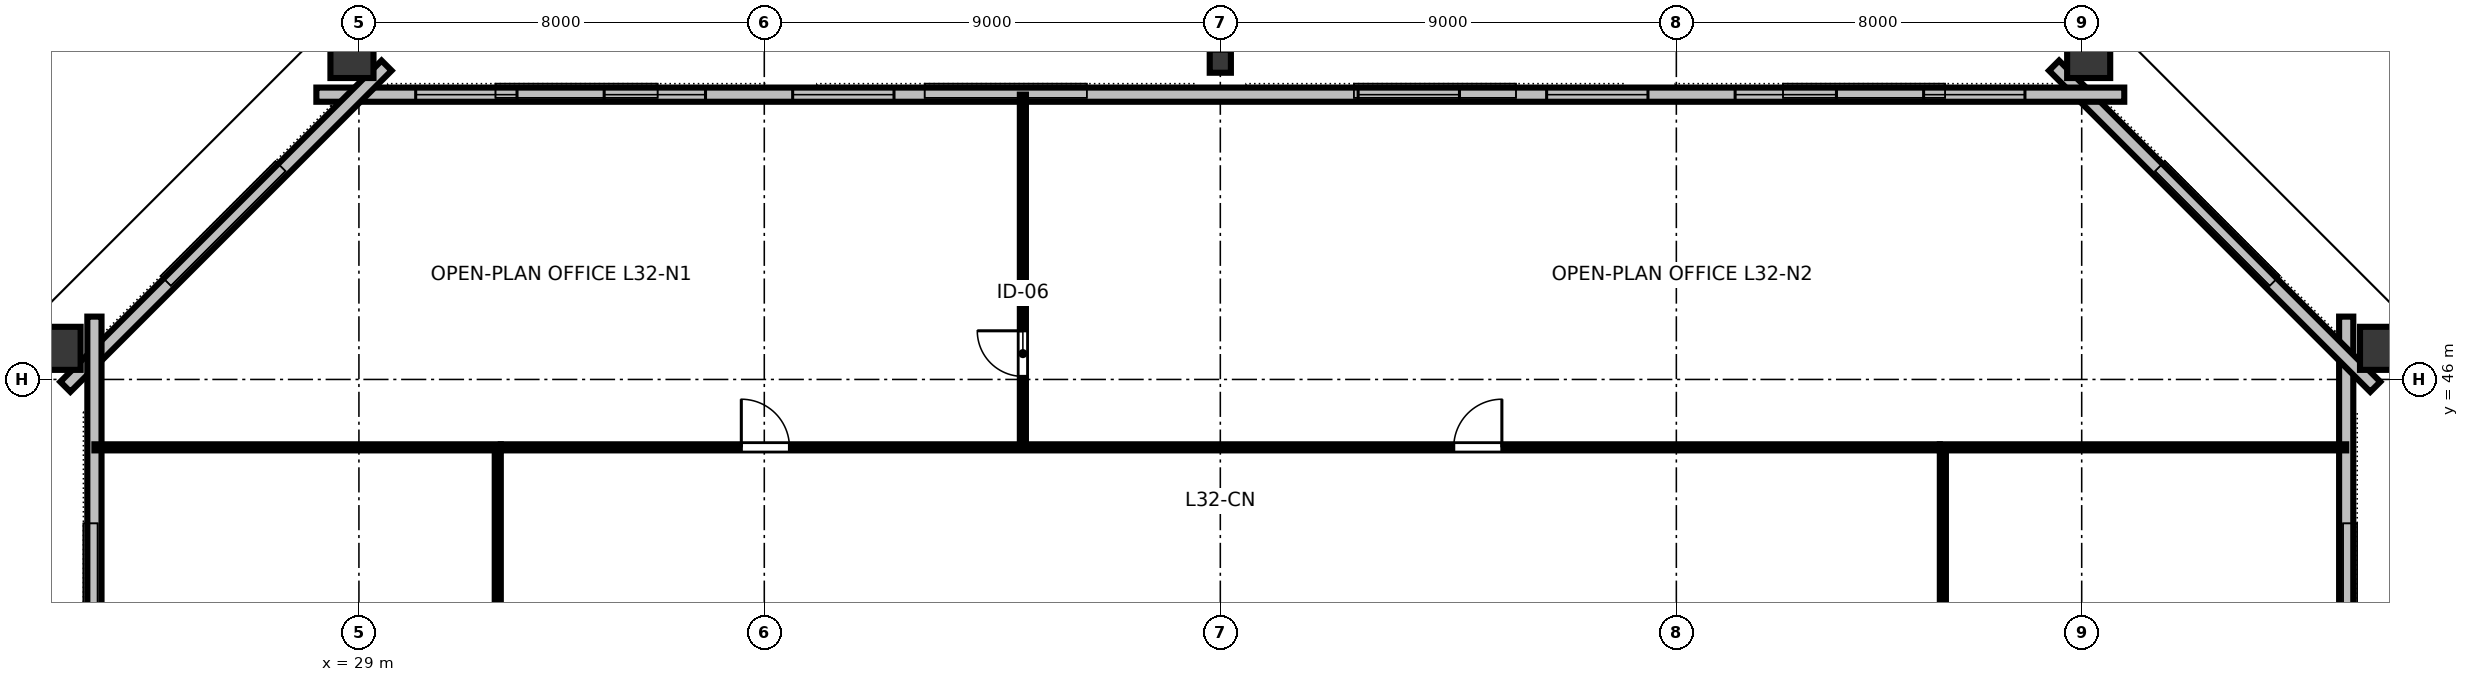
"""IFC4 building model, lengths in metres.
Left out: names, types, materials, properties, quantities, classifications, styles, units other than length and angle.
Written with IfcOpenShell. Run it as: python <this file> out.ifc"""

import sys

from ifc_helpers import new_model, si_unit, direction, frame, frame_2d, origin, origin_2d, place, context, subcontext, project, spatial, rectangle, hollow_rectangle, i_section, extrude, element, fill, save


model = new_model("IFC4")
c1 = context("Model", 3, precision=1e-05, world=origin(), true_north=direction((0.0, 1.0)))
c2 = subcontext(c1, "Body", "Model", "MODEL_VIEW")
j1 = project(units=[si_unit("LENGTHUNIT", "METRE"), si_unit("PLANEANGLEUNIT", "RADIAN")], contexts=[c1])
p1 = place(None, origin())
s1 = spatial("IfcSite", under=j1, at=p1, CompositionType="ELEMENT")
p2 = place(p1, origin())
s2 = spatial("IfcBuilding", under=s1, at=p2, CompositionType="ELEMENT")
p3 = place(p2, frame((0.0, 0.0, 124.0)))
s3 = spatial("IfcBuildingStorey", under=s2, at=p3, CompositionType="ELEMENT", Elevation=124.0)
p4 = place(p3, frame((68.992, 46.614, 0.0), z_axis=(0.088768956543, 0.044637690454, 0.995051530799), x_axis=(-0.888984507302, -0.447028069279, 0.099360208609)))
e1 = element("IfcColumn", 1, at=p4, inside=s3, PredefinedType="COLUMN", context=c2, shape_type="SweptSolid", body=[
    extrude(hollow_rectangle(XDim=0.85, YDim=1.0, WallThickness=0.05, at=origin_2d()), origin(), (0.0, 0.0, 1.0), 3.375),
])
p5 = place(p3, frame((63.137, 52.448, 0.0), z_axis=(0.059349985837, 0.074042726233, 0.995487445362), x_axis=(-0.780273153145, 0.625438891084, 0.0)))
e2 = element("IfcColumn", 2, at=p5, inside=s3, PredefinedType="COLUMN", context=c2, shape_type="SweptSolid", body=[
    extrude(hollow_rectangle(XDim=0.85, YDim=1.0, WallThickness=0.05, at=origin_2d()), origin(), (0.0, 0.0, 1.0), 3.373),
])
p6 = place(p3, frame((46.0, 52.28, 0.0), z_axis=(0.0, 0.074245582927, 0.997239987874), x_axis=(-1.0, 0.0, 0.0)))
e3 = element("IfcColumn", 3, at=p6, inside=s3, PredefinedType="COLUMN", context=c2, shape_type="SweptSolid", body=[
    extrude(i_section(OverallWidth=0.418, OverallDepth=0.455, WebThickness=0.042, FlangeThickness=0.068, FilletRadius=0.025, at=origin_2d()), origin(), (0.0, 0.0, 1.0), 3.367),
])
p7 = place(p3, frame((28.863, 52.448, 0.0), z_axis=(-0.059349985837, 0.074042726233, 0.995487445362), x_axis=(-0.780273153145, -0.625438891084, 0.0)))
e4 = element("IfcColumn", 4, at=p7, inside=s3, PredefinedType="COLUMN", context=c2, shape_type="SweptSolid", body=[
    extrude(hollow_rectangle(XDim=0.85, YDim=1.0, WallThickness=0.05, at=origin_2d()), origin(), (0.0, 0.0, 1.0), 3.373),
])
p8 = place(p3, frame((23.008, 46.614, 0.0), z_axis=(-0.088768956543, 0.044637690454, 0.995051530799), x_axis=(0.888984507302, -0.447028069279, 0.099360208609)))
e5 = element("IfcColumn", 5, at=p8, inside=s3, PredefinedType="COLUMN", context=c2, shape_type="SweptSolid", body=[
    extrude(hollow_rectangle(XDim=0.85, YDim=1.0, WallThickness=0.05, at=origin_2d()), origin(), (0.0, 0.0, 1.0), 3.375),
])
p9 = place(p3, frame((68.22, 16.76, 0.0), z_axis=(0.0, 0.0, 1.0), x_axis=(0.0, 1.0, 0.0)))
e6 = element("IfcWall", 6, at=p9, inside=s3, PredefinedType="STANDARD", context=c2, shape_type="SweptSolid", body=[
    extrude(rectangle(XDim=30.48, YDim=0.28, at=frame_2d((15.24, 0.0))), origin(), (0.0, 0.0, 1.0), 3.36),
])
p10 = place(p9, frame((6.16, 0.0, 0.8)))
e7 = element("IfcOpeningElement", 7, at=p10, cuts=e6, PredefinedType="OPENING", context=c2, shape_type="SweptSolid", body=[
    extrude(rectangle(XDim=2.0, YDim=1.95, at=frame_2d((1.0, 0.975))), frame((0.0, 0.15, 0.0), z_axis=(0.0, -1.0, 0.0), x_axis=(1.0, 0.0, 0.0)), (0.0, 0.0, 1.0), 0.3),
])
p11 = place(p9, frame((22.32, 0.0, 0.8)))
e8 = element("IfcOpeningElement", 8, at=p11, cuts=e6, PredefinedType="OPENING", context=c2, shape_type="SweptSolid", body=[
    extrude(rectangle(XDim=2.0, YDim=1.95, at=frame_2d((1.0, 0.975))), frame((0.0, 0.15, 0.0), z_axis=(0.0, -1.0, 0.0), x_axis=(1.0, 0.0, 0.0)), (0.0, 0.0, 1.0), 0.3),
])
p12 = place(p3, frame((68.794, 45.854, 0.0), z_axis=(0.0, 0.0, 1.0), x_axis=(-0.707106781187, 0.707106781187, 0.0)))
e9 = element("IfcWall", 9, at=p12, inside=s3, PredefinedType="STANDARD", context=c2, shape_type="SweptSolid", body=[
    extrude(rectangle(XDim=8.965, YDim=0.28, at=frame_2d((4.482, 0.0))), origin(), (0.0, 0.0, 1.0), 3.36),
])
p13 = place(p3, frame((63.84, 51.62, 0.0), z_axis=(0.0, 0.0, 1.0), x_axis=(-1.0, 0.0, 0.0)))
e10 = element("IfcWall", 10, at=p13, inside=s3, PredefinedType="STANDARD", context=c2, shape_type="SweptSolid", body=[
    extrude(rectangle(XDim=35.68, YDim=0.28, at=frame_2d((17.84, 0.0))), origin(), (0.0, 0.0, 1.0), 3.36),
])
p14 = place(p13, frame((1.96, 0.0, 0.8)))
e11 = element("IfcOpeningElement", 11, at=p14, cuts=e10, PredefinedType="OPENING", context=c2, shape_type="SweptSolid", body=[
    extrude(rectangle(XDim=2.0, YDim=1.95, at=frame_2d((1.0, 0.975))), frame((0.0, 0.15, 0.0), z_axis=(0.0, -1.0, 0.0), x_axis=(1.0, 0.0, 0.0)), (0.0, 0.0, 1.0), 0.3),
])
p15 = place(p13, frame((5.68, 0.0, 0.8)))
e12 = element("IfcOpeningElement", 12, at=p15, cuts=e10, PredefinedType="OPENING", context=c2, shape_type="SweptSolid", body=[
    extrude(rectangle(XDim=2.0, YDim=1.95, at=frame_2d((1.0, 0.975))), frame((0.0, 0.15, 0.0), z_axis=(0.0, -1.0, 0.0), x_axis=(1.0, 0.0, 0.0)), (0.0, 0.0, 1.0), 0.3),
])
p16 = place(p13, frame((9.4, 0.0, 0.8)))
e13 = element("IfcOpeningElement", 13, at=p16, cuts=e10, PredefinedType="OPENING", context=c2, shape_type="SweptSolid", body=[
    extrude(rectangle(XDim=2.0, YDim=1.95, at=frame_2d((1.0, 0.975))), frame((0.0, 0.15, 0.0), z_axis=(0.0, -1.0, 0.0), x_axis=(1.0, 0.0, 0.0)), (0.0, 0.0, 1.0), 0.3),
])
p17 = place(p13, frame((13.12, 0.0, 0.8)))
e14 = element("IfcOpeningElement", 14, at=p17, cuts=e10, PredefinedType="OPENING", context=c2, shape_type="SweptSolid", body=[
    extrude(rectangle(XDim=2.0, YDim=1.95, at=frame_2d((1.0, 0.975))), frame((0.0, 0.15, 0.0), z_axis=(0.0, -1.0, 0.0), x_axis=(1.0, 0.0, 0.0)), (0.0, 0.0, 1.0), 0.3),
])
p18 = place(p13, frame((24.28, 0.0, 0.8)))
e15 = element("IfcOpeningElement", 15, at=p18, cuts=e10, PredefinedType="OPENING", context=c2, shape_type="SweptSolid", body=[
    extrude(rectangle(XDim=2.0, YDim=1.95, at=frame_2d((1.0, 0.975))), frame((0.0, 0.15, 0.0), z_axis=(0.0, -1.0, 0.0), x_axis=(1.0, 0.0, 0.0)), (0.0, 0.0, 1.0), 0.3),
])
p19 = place(p13, frame((28.0, 0.0, 0.8)))
e16 = element("IfcOpeningElement", 16, at=p19, cuts=e10, PredefinedType="OPENING", context=c2, shape_type="SweptSolid", body=[
    extrude(rectangle(XDim=2.0, YDim=1.95, at=frame_2d((1.0, 0.975))), frame((0.0, 0.15, 0.0), z_axis=(0.0, -1.0, 0.0), x_axis=(1.0, 0.0, 0.0)), (0.0, 0.0, 1.0), 0.3),
])
p20 = place(p13, frame((31.72, 0.0, 0.8)))
e17 = element("IfcOpeningElement", 17, at=p20, cuts=e10, PredefinedType="OPENING", context=c2, shape_type="SweptSolid", body=[
    extrude(rectangle(XDim=2.0, YDim=1.95, at=frame_2d((1.0, 0.975))), frame((0.0, 0.15, 0.0), z_axis=(0.0, -1.0, 0.0), x_axis=(1.0, 0.0, 0.0)), (0.0, 0.0, 1.0), 0.3),
])
p21 = place(p3, frame((29.545, 52.194, 0.0), z_axis=(0.0, 0.0, 1.0), x_axis=(-0.707106781187, -0.707106781187, 0.0)))
e18 = element("IfcWall", 18, at=p21, inside=s3, PredefinedType="STANDARD", context=c2, shape_type="SweptSolid", body=[
    extrude(rectangle(XDim=8.965, YDim=0.28, at=frame_2d((4.482, 0.0))), origin(), (0.0, 0.0, 1.0), 3.36),
])
p22 = place(p3, frame((23.78, 47.24, 0.0), z_axis=(0.0, 0.0, 1.0), x_axis=(0.0, -1.0, 0.0)))
e19 = element("IfcWall", 19, at=p22, inside=s3, PredefinedType="STANDARD", context=c2, shape_type="SweptSolid", body=[
    extrude(rectangle(XDim=30.48, YDim=0.28, at=frame_2d((15.24, 0.0))), origin(), (0.0, 0.0, 1.0), 3.36),
])
p23 = place(p22, frame((6.16, 0.0, 0.8)))
e20 = element("IfcOpeningElement", 20, at=p23, cuts=e19, PredefinedType="OPENING", context=c2, shape_type="SweptSolid", body=[
    extrude(rectangle(XDim=2.0, YDim=1.95, at=frame_2d((1.0, 0.975))), frame((0.0, 0.15, 0.0), z_axis=(0.0, -1.0, 0.0), x_axis=(1.0, 0.0, 0.0)), (0.0, 0.0, 1.0), 0.3),
])
p24 = place(p22, frame((18.28, 0.0, 0.8)))
e21 = element("IfcOpeningElement", 21, at=p24, cuts=e19, PredefinedType="OPENING", context=c2, shape_type="SweptSolid", body=[
    extrude(rectangle(XDim=2.0, YDim=1.95, at=frame_2d((1.0, 0.975))), frame((0.0, 0.15, 0.0), z_axis=(0.0, -1.0, 0.0), x_axis=(1.0, 0.0, 0.0)), (0.0, 0.0, 1.0), 0.3),
])
p25 = place(p22, frame((22.32, 0.0, 0.8)))
e22 = element("IfcOpeningElement", 22, at=p25, cuts=e19, PredefinedType="OPENING", context=c2, shape_type="SweptSolid", body=[
    extrude(rectangle(XDim=2.0, YDim=1.95, at=frame_2d((1.0, 0.975))), frame((0.0, 0.15, 0.0), z_axis=(0.0, -1.0, 0.0), x_axis=(1.0, 0.0, 0.0)), (0.0, 0.0, 1.0), 0.3),
])
p26 = place(p3, frame((42.104, 44.66, 0.0), z_axis=(0.0, 0.0, 1.0), x_axis=(0.0, 1.0, 0.0)))
e23 = element("IfcWall", 23, at=p26, inside=s3, PredefinedType="PARTITIONING", context=c2, shape_type="SweptSolid", body=[
    extrude(rectangle(XDim=6.96, YDim=0.12, at=frame_2d((3.48, 0.0))), origin(), (0.0, 0.0, 1.0), 2.64),
])
p27 = place(p26, frame((1.4, 0.0, 0.0)))
e24 = element("IfcOpeningElement", 24, at=p27, cuts=e23, PredefinedType="OPENING", context=c2, shape_type="SweptSolid", body=[
    extrude(rectangle(XDim=0.9, YDim=2.15, at=frame_2d((0.45, 1.075))), frame((0.0, 0.07, 0.0), z_axis=(0.0, -1.0, 0.0), x_axis=(1.0, 0.0, 0.0)), (0.0, 0.0, 1.0), 0.14),
])
p28 = place(p3, frame((31.8, 44.66, 0.0), z_axis=(0.0, 0.0, 1.0), x_axis=(1.0, 0.0, 0.0)))
e25 = element("IfcWall", 25, at=p28, inside=s3, PredefinedType="PARTITIONING", context=c2, shape_type="SweptSolid", body=[
    extrude(rectangle(XDim=28.4, YDim=0.12, at=frame_2d((14.2, 0.0))), origin(), (0.0, 0.0, 1.0), 2.64),
])
p29 = place(p28, frame((4.747, 0.0, 0.0)))
e26 = element("IfcOpeningElement", 26, at=p29, cuts=e25, PredefinedType="OPENING", context=c2, shape_type="SweptSolid", body=[
    extrude(rectangle(XDim=0.95, YDim=2.15, at=frame_2d((0.475, 1.075))), frame((0.0, 0.07, 0.0), z_axis=(0.0, -1.0, 0.0), x_axis=(1.0, 0.0, 0.0)), (0.0, 0.0, 1.0), 0.14),
])
p30 = place(p28, frame((18.807, 0.0, 0.0)))
e27 = element("IfcOpeningElement", 27, at=p30, cuts=e25, PredefinedType="OPENING", context=c2, shape_type="SweptSolid", body=[
    extrude(rectangle(XDim=0.95, YDim=2.15, at=frame_2d((0.475, 1.075))), frame((0.0, 0.07, 0.0), z_axis=(0.0, -1.0, 0.0), x_axis=(1.0, 0.0, 0.0)), (0.0, 0.0, 1.0), 0.14),
])
p31 = place(p3, frame((31.74, 33.02, 0.0), z_axis=(0.0, 0.0, 1.0), x_axis=(0.0, 1.0, 0.0)))
e28 = element("IfcWall", 28, at=p31, inside=s3, PredefinedType="PARTITIONING", context=c2, shape_type="SweptSolid", body=[
    extrude(rectangle(XDim=11.58, YDim=0.12, at=frame_2d((5.79, 0.0))), origin(), (0.0, 0.0, 1.0), 2.64),
])
p32 = place(p31, frame((0.826, 0.0, 0.0)))
e29 = element("IfcOpeningElement", 29, at=p32, cuts=e28, PredefinedType="OPENING", context=c2, shape_type="SweptSolid", body=[
    extrude(rectangle(XDim=0.95, YDim=2.15, at=frame_2d((0.475, 1.075))), frame((0.0, 0.07, 0.0), z_axis=(0.0, -1.0, 0.0), x_axis=(1.0, 0.0, 0.0)), (0.0, 0.0, 1.0), 0.14),
])
p33 = place(p31, frame((6.516, 0.0, 0.0)))
e30 = element("IfcOpeningElement", 30, at=p33, cuts=e28, PredefinedType="OPENING", context=c2, shape_type="SweptSolid", body=[
    extrude(rectangle(XDim=0.95, YDim=2.15, at=frame_2d((0.475, 1.075))), frame((0.0, 0.07, 0.0), z_axis=(0.0, -1.0, 0.0), x_axis=(1.0, 0.0, 0.0)), (0.0, 0.0, 1.0), 0.14),
])
p34 = place(p3, frame((60.26, 33.02, 0.0), z_axis=(0.0, 0.0, 1.0), x_axis=(0.0, 1.0, 0.0)))
e31 = element("IfcWall", 31, at=p34, inside=s3, PredefinedType="PARTITIONING", context=c2, shape_type="SweptSolid", body=[
    extrude(rectangle(XDim=11.58, YDim=0.12, at=frame_2d((5.79, 0.0))), origin(), (0.0, 0.0, 1.0), 2.64),
])
p35 = place(p34, frame((0.62, 0.0, 0.0)))
e32 = element("IfcOpeningElement", 32, at=p35, cuts=e31, PredefinedType="OPENING", context=c2, shape_type="SweptSolid", body=[
    extrude(rectangle(XDim=0.95, YDim=2.15, at=frame_2d((0.475, 1.075))), frame((0.0, 0.07, 0.0), z_axis=(0.0, -1.0, 0.0), x_axis=(1.0, 0.0, 0.0)), (0.0, 0.0, 1.0), 0.14),
])
p36 = place(p34, frame((6.31, 0.0, 0.0)))
e33 = element("IfcOpeningElement", 33, at=p36, cuts=e31, PredefinedType="OPENING", context=c2, shape_type="SweptSolid", body=[
    extrude(rectangle(XDim=0.95, YDim=2.15, at=frame_2d((0.475, 1.075))), frame((0.0, 0.07, 0.0), z_axis=(0.0, -1.0, 0.0), x_axis=(1.0, 0.0, 0.0)), (0.0, 0.0, 1.0), 0.14),
])
for number, where, z_axis, x_axis in (
    (34, (31.8, 44.66, 0.0), (0.0, 0.0, 1.0), (-1.0, 0.0, 0.0)),
    (35, (60.2, 44.66, 0.0), (0.0, 0.0, 1.0), (1.0, 0.0, 0.0)),
):
    element("IfcWall", number, at=place(p3, frame(where, z_axis=z_axis, x_axis=x_axis)), inside=s3, PredefinedType="PARTITIONING", context=c2, shape_type="SweptSolid", body=[
        extrude(rectangle(XDim=8.02, YDim=0.12, at=frame_2d((4.01, 0.0))), origin(), (0.0, 0.0, 1.0), 2.64),
    ])
p37 = place(p14, origin())
e36 = element("IfcWindow", 36, at=p37, inside=s3, PartitioningType="SINGLE_PANEL", PredefinedType="WINDOW", context=c2, shape_type="SweptSolid", body=[
    extrude(rectangle(XDim=2.0, YDim=1.95, at=frame_2d((1.0, 0.975))), frame((0.0, 0.03, 0.0), z_axis=(0.0, -1.0, 0.0), x_axis=(1.0, 0.0, 0.0)), (0.0, 0.0, 1.0), 0.06),
])
fill(e11, e36)
p38 = place(p15, origin())
e37 = element("IfcWindow", 37, at=p38, inside=s3, PartitioningType="SINGLE_PANEL", PredefinedType="WINDOW", context=c2, shape_type="SweptSolid", body=[
    extrude(rectangle(XDim=2.0, YDim=1.95, at=frame_2d((1.0, 0.975))), frame((0.0, 0.03, 0.0), z_axis=(0.0, -1.0, 0.0), x_axis=(1.0, 0.0, 0.0)), (0.0, 0.0, 1.0), 0.06),
])
fill(e12, e37)
p39 = place(p16, origin())
e38 = element("IfcWindow", 38, at=p39, inside=s3, PartitioningType="SINGLE_PANEL", PredefinedType="WINDOW", context=c2, shape_type="SweptSolid", body=[
    extrude(rectangle(XDim=2.0, YDim=1.95, at=frame_2d((1.0, 0.975))), frame((0.0, 0.03, 0.0), z_axis=(0.0, -1.0, 0.0), x_axis=(1.0, 0.0, 0.0)), (0.0, 0.0, 1.0), 0.06),
])
fill(e13, e38)
p40 = place(p17, origin())
e39 = element("IfcWindow", 39, at=p40, inside=s3, PartitioningType="SINGLE_PANEL", PredefinedType="WINDOW", context=c2, shape_type="SweptSolid", body=[
    extrude(rectangle(XDim=2.0, YDim=1.95, at=frame_2d((1.0, 0.975))), frame((0.0, 0.03, 0.0), z_axis=(0.0, -1.0, 0.0), x_axis=(1.0, 0.0, 0.0)), (0.0, 0.0, 1.0), 0.06),
])
fill(e14, e39)
p41 = place(p18, origin())
e40 = element("IfcWindow", 40, at=p41, inside=s3, PartitioningType="SINGLE_PANEL", PredefinedType="WINDOW", context=c2, shape_type="SweptSolid", body=[
    extrude(rectangle(XDim=2.0, YDim=1.95, at=frame_2d((1.0, 0.975))), frame((0.0, 0.03, 0.0), z_axis=(0.0, -1.0, 0.0), x_axis=(1.0, 0.0, 0.0)), (0.0, 0.0, 1.0), 0.06),
])
fill(e15, e40)
p42 = place(p19, origin())
e41 = element("IfcWindow", 41, at=p42, inside=s3, PartitioningType="SINGLE_PANEL", PredefinedType="WINDOW", context=c2, shape_type="SweptSolid", body=[
    extrude(rectangle(XDim=2.0, YDim=1.95, at=frame_2d((1.0, 0.975))), frame((0.0, 0.03, 0.0), z_axis=(0.0, -1.0, 0.0), x_axis=(1.0, 0.0, 0.0)), (0.0, 0.0, 1.0), 0.06),
])
fill(e16, e41)
p43 = place(p20, origin())
e42 = element("IfcWindow", 42, at=p43, inside=s3, PartitioningType="SINGLE_PANEL", PredefinedType="WINDOW", context=c2, shape_type="SweptSolid", body=[
    extrude(rectangle(XDim=2.0, YDim=1.95, at=frame_2d((1.0, 0.975))), frame((0.0, 0.03, 0.0), z_axis=(0.0, -1.0, 0.0), x_axis=(1.0, 0.0, 0.0)), (0.0, 0.0, 1.0), 0.06),
])
fill(e17, e42)
p44 = place(p27, origin())
e43 = element("IfcDoor", 43, at=p44, inside=s3, OperationType="SINGLE_SWING_RIGHT", PredefinedType="DOOR", context=c2, shape_type="SweptSolid", body=[
    extrude(rectangle(XDim=0.9, YDim=2.15, at=frame_2d((0.45, 1.075))), frame((0.0, 0.025, 0.0), z_axis=(0.0, -1.0, 0.0), x_axis=(1.0, 0.0, 0.0)), (0.0, 0.0, 1.0), 0.05),
])
fill(e24, e43)
p45 = place(p29, origin())
e44 = element("IfcDoor", 44, at=p45, inside=s3, OperationType="SINGLE_SWING_LEFT", PredefinedType="DOOR", context=c2, shape_type="SweptSolid", body=[
    extrude(rectangle(XDim=0.95, YDim=2.15, at=frame_2d((0.475, 1.075))), frame((0.0, 0.025, 0.0), z_axis=(0.0, -1.0, 0.0), x_axis=(1.0, 0.0, 0.0)), (0.0, 0.0, 1.0), 0.05),
])
fill(e26, e44)
p46 = place(p30, origin())
e45 = element("IfcDoor", 45, at=p46, inside=s3, OperationType="SINGLE_SWING_RIGHT", PredefinedType="DOOR", context=c2, shape_type="SweptSolid", body=[
    extrude(rectangle(XDim=0.95, YDim=2.15, at=frame_2d((0.475, 1.075))), frame((0.0, 0.025, 0.0), z_axis=(0.0, -1.0, 0.0), x_axis=(1.0, 0.0, 0.0)), (0.0, 0.0, 1.0), 0.05),
])
fill(e27, e45)
save(model, sys.argv[1])
